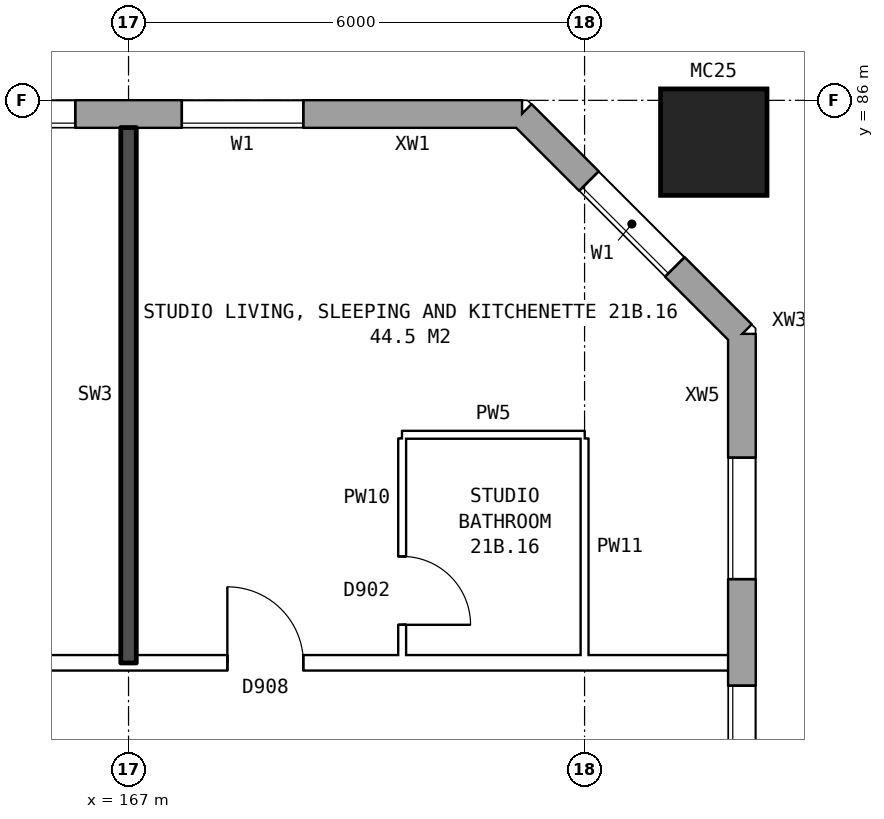
"""IFC4 building model, lengths in metres.
Left out: names, types, materials, properties, quantities, classifications, styles, units other than length and angle.
Written with IfcOpenShell. Run it as: python <this file> out.ifc"""

import sys

from ifc_helpers import new_model, si_unit, direction, frame, frame_2d, origin, origin_2d, place, context, subcontext, project, spatial, rectangle, hollow_rectangle, extrude, element, fill, save


model = new_model("IFC4")
c1 = context("Model", 3, precision=1e-05, world=origin(), true_north=direction((0.0, 1.0)))
c2 = subcontext(c1, "Body", "Model", "MODEL_VIEW")
j1 = project(units=[si_unit("LENGTHUNIT", "METRE"), si_unit("PLANEANGLEUNIT", "RADIAN")], contexts=[c1])
p1 = place(None, origin())
s1 = spatial("IfcSite", under=j1, at=p1, CompositionType="ELEMENT")
p2 = place(p1, origin())
s2 = spatial("IfcBuilding", under=s1, at=p2, CompositionType="ELEMENT")
p3 = place(p2, frame((0.0, 0.0, 77.8)))
s3 = spatial("IfcBuildingStorey", under=s2, at=p3, CompositionType="ELEMENT", Elevation=77.8)
p4 = place(p3, frame((174.7, 85.45, 0.0), z_axis=(0.0, 0.0, 1.0), x_axis=(1.0, 0.0, 0.0)))
e1 = element("IfcColumn", 1, at=p4, inside=s3, PredefinedType="COLUMN", context=c2, shape_type="SweptSolid", body=[
    extrude(hollow_rectangle(XDim=1.4, YDim=1.4, WallThickness=0.075, at=origin_2d()), origin(), (0.0, 0.0, 1.0), 3.1),
])
p5 = place(p3, frame((175.07, 57.075, 0.0), z_axis=(0.0, 0.0, 1.0), x_axis=(0.0, 1.0, 0.0)))
e2 = element("IfcWall", 2, at=p5, inside=s3, PredefinedType="STANDARD", context=c2, shape_type="SweptSolid", body=[
    extrude(rectangle(XDim=25.851, YDim=0.36, at=frame_2d((12.925, 0.0))), origin(), (0.0, 0.0, 1.0), 2.85),
])
p6 = place(p5, frame((1.625, 0.0, 0.8)))
e3 = element("IfcOpeningElement", 3, at=p6, cuts=e2, PredefinedType="OPENING", context=c2, shape_type="SweptSolid", body=[
    extrude(rectangle(XDim=1.6, YDim=1.8, at=frame_2d((0.8, 0.9))), frame((0.0, 0.19, 0.0), z_axis=(0.0, -1.0, 0.0), x_axis=(1.0, 0.0, 0.0)), (0.0, 0.0, 1.0), 0.38),
])
p7 = place(p5, frame((4.625, 0.0, 0.8)))
e4 = element("IfcOpeningElement", 4, at=p7, cuts=e2, PredefinedType="OPENING", context=c2, shape_type="SweptSolid", body=[
    extrude(rectangle(XDim=1.6, YDim=1.8, at=frame_2d((0.8, 0.9))), frame((0.0, 0.19, 0.0), z_axis=(0.0, -1.0, 0.0), x_axis=(1.0, 0.0, 0.0)), (0.0, 0.0, 1.0), 0.38),
])
p8 = place(p5, frame((7.625, 0.0, 0.8)))
e5 = element("IfcOpeningElement", 5, at=p8, cuts=e2, PredefinedType="OPENING", context=c2, shape_type="SweptSolid", body=[
    extrude(rectangle(XDim=1.6, YDim=1.8, at=frame_2d((0.8, 0.9))), frame((0.0, 0.19, 0.0), z_axis=(0.0, -1.0, 0.0), x_axis=(1.0, 0.0, 0.0)), (0.0, 0.0, 1.0), 0.38),
])
p9 = place(p5, frame((6.525, 0.0, 0.8)))
e6 = element("IfcOpeningElement", 6, at=p9, cuts=e2, PredefinedType="OPENING", context=c2, shape_type="SweptSolid", body=[
    extrude(rectangle(XDim=0.8, YDim=1.8, at=frame_2d((0.4, 0.9))), frame((0.0, 0.19, 0.0), z_axis=(0.0, -1.0, 0.0), x_axis=(1.0, 0.0, 0.0)), (0.0, 0.0, 1.0), 0.38),
])
p10 = place(p5, frame((9.525, 0.0, 0.8)))
e7 = element("IfcOpeningElement", 7, at=p10, cuts=e2, PredefinedType="OPENING", context=c2, shape_type="SweptSolid", body=[
    extrude(rectangle(XDim=1.4, YDim=1.2, at=frame_2d((0.7, 0.6))), frame((0.0, 0.19, 0.0), z_axis=(0.0, -1.0, 0.0), x_axis=(1.0, 0.0, 0.0)), (0.0, 0.0, 1.0), 0.38),
])
p11 = place(p5, frame((16.625, 0.0, 0.8)))
e8 = element("IfcOpeningElement", 8, at=p11, cuts=e2, PredefinedType="OPENING", context=c2, shape_type="SweptSolid", body=[
    extrude(rectangle(XDim=1.6, YDim=1.8, at=frame_2d((0.8, 0.9))), frame((0.0, 0.19, 0.0), z_axis=(0.0, -1.0, 0.0), x_axis=(1.0, 0.0, 0.0)), (0.0, 0.0, 1.0), 0.38),
])
p12 = place(p5, frame((19.625, 0.0, 0.8)))
e9 = element("IfcOpeningElement", 9, at=p12, cuts=e2, PredefinedType="OPENING", context=c2, shape_type="SweptSolid", body=[
    extrude(rectangle(XDim=1.6, YDim=1.8, at=frame_2d((0.8, 0.9))), frame((0.0, 0.19, 0.0), z_axis=(0.0, -1.0, 0.0), x_axis=(1.0, 0.0, 0.0)), (0.0, 0.0, 1.0), 0.38),
])
p13 = place(p5, frame((22.625, 0.0, 0.8)))
e10 = element("IfcOpeningElement", 10, at=p13, cuts=e2, PredefinedType="OPENING", context=c2, shape_type="SweptSolid", body=[
    extrude(rectangle(XDim=1.6, YDim=1.8, at=frame_2d((0.8, 0.9))), frame((0.0, 0.19, 0.0), z_axis=(0.0, -1.0, 0.0), x_axis=(1.0, 0.0, 0.0)), (0.0, 0.0, 1.0), 0.38),
])
p14 = place(p5, frame((12.275, 0.0, 0.8)))
e11 = element("IfcOpeningElement", 11, at=p14, cuts=e2, PredefinedType="OPENING", context=c2, shape_type="SweptSolid", body=[
    extrude(rectangle(XDim=1.2, YDim=1.8, at=frame_2d((0.6, 0.9))), frame((0.0, 0.19, 0.0), z_axis=(0.0, -1.0, 0.0), x_axis=(1.0, 0.0, 0.0)), (0.0, 0.0, 1.0), 0.38),
])
p15 = place(p5, frame((14.475, 0.0, 0.8)))
e12 = element("IfcOpeningElement", 12, at=p15, cuts=e2, PredefinedType="OPENING", context=c2, shape_type="SweptSolid", body=[
    extrude(rectangle(XDim=1.2, YDim=0.9, at=frame_2d((0.6, 0.45))), frame((0.0, 0.19, 0.0), z_axis=(0.0, -1.0, 0.0), x_axis=(1.0, 0.0, 0.0)), (0.0, 0.0, 1.0), 0.38),
])
p16 = place(p5, frame((18.525, 0.0, 0.8)))
e13 = element("IfcOpeningElement", 13, at=p16, cuts=e2, PredefinedType="OPENING", context=c2, shape_type="SweptSolid", body=[
    extrude(rectangle(XDim=0.6, YDim=1.8, at=frame_2d((0.3, 0.9))), frame((0.0, 0.19, 0.0), z_axis=(0.0, -1.0, 0.0), x_axis=(1.0, 0.0, 0.0)), (0.0, 0.0, 1.0), 0.38),
])
p17 = place(p3, frame((175.07, 82.925, 0.0), z_axis=(0.0, 0.0, 1.0), x_axis=(-0.707106781187, 0.707106781187, 0.0)))
e14 = element("IfcWall", 14, at=p17, inside=s3, PredefinedType="STANDARD", context=c2, shape_type="SweptSolid", body=[
    extrude(rectangle(XDim=4.094, YDim=0.36, at=frame_2d((2.047, 0.0))), origin(), (0.0, 0.0, 1.0), 2.85),
])
p18 = place(p17, frame((1.247, 0.0, 0.8)))
e15 = element("IfcOpeningElement", 15, at=p18, cuts=e14, PredefinedType="OPENING", context=c2, shape_type="SweptSolid", body=[
    extrude(rectangle(XDim=1.6, YDim=1.8, at=frame_2d((0.8, 0.9))), frame((0.0, 0.19, 0.0), z_axis=(0.0, -1.0, 0.0), x_axis=(1.0, 0.0, 0.0)), (0.0, 0.0, 1.0), 0.38),
])
p19 = place(p3, frame((172.175, 85.82, 0.0), z_axis=(0.0, 0.0, 1.0), x_axis=(-1.0, 0.0, 0.0)))
e16 = element("IfcWall", 16, at=p19, inside=s3, PredefinedType="STANDARD", context=c2, shape_type="SweptSolid", body=[
    extrude(rectangle(XDim=38.101, YDim=0.36, at=frame_2d((19.05, 0.0))), origin(), (0.0, 0.0, 1.0), 2.85),
])
p20 = place(p19, frame((2.875, 0.0, 0.8)))
e17 = element("IfcOpeningElement", 17, at=p20, cuts=e16, PredefinedType="OPENING", context=c2, shape_type="SweptSolid", body=[
    extrude(rectangle(XDim=1.6, YDim=1.8, at=frame_2d((0.8, 0.9))), frame((0.0, 0.19, 0.0), z_axis=(0.0, -1.0, 0.0), x_axis=(1.0, 0.0, 0.0)), (0.0, 0.0, 1.0), 0.38),
])
p21 = place(p19, frame((5.875, 0.0, 0.8)))
e18 = element("IfcOpeningElement", 18, at=p21, cuts=e16, PredefinedType="OPENING", context=c2, shape_type="SweptSolid", body=[
    extrude(rectangle(XDim=1.6, YDim=1.8, at=frame_2d((0.8, 0.9))), frame((0.0, 0.19, 0.0), z_axis=(0.0, -1.0, 0.0), x_axis=(1.0, 0.0, 0.0)), (0.0, 0.0, 1.0), 0.38),
])
p22 = place(p19, frame((7.775, 0.0, 1.7)))
e19 = element("IfcOpeningElement", 19, at=p22, cuts=e16, PredefinedType="OPENING", context=c2, shape_type="SweptSolid", body=[
    extrude(rectangle(XDim=0.6, YDim=0.9, at=frame_2d((0.3, 0.45))), frame((0.0, 0.19, 0.0), z_axis=(0.0, -1.0, 0.0), x_axis=(1.0, 0.0, 0.0)), (0.0, 0.0, 1.0), 0.38),
])
p23 = place(p19, frame((11.875, 0.0, 0.8)))
e20 = element("IfcOpeningElement", 20, at=p23, cuts=e16, PredefinedType="OPENING", context=c2, shape_type="SweptSolid", body=[
    extrude(rectangle(XDim=1.6, YDim=1.8, at=frame_2d((0.8, 0.9))), frame((0.0, 0.19, 0.0), z_axis=(0.0, -1.0, 0.0), x_axis=(1.0, 0.0, 0.0)), (0.0, 0.0, 1.0), 0.38),
])
p24 = place(p19, frame((14.875, 0.0, 0.8)))
e21 = element("IfcOpeningElement", 21, at=p24, cuts=e16, PredefinedType="OPENING", context=c2, shape_type="SweptSolid", body=[
    extrude(rectangle(XDim=1.6, YDim=1.8, at=frame_2d((0.8, 0.9))), frame((0.0, 0.19, 0.0), z_axis=(0.0, -1.0, 0.0), x_axis=(1.0, 0.0, 0.0)), (0.0, 0.0, 1.0), 0.38),
])
p25 = place(p19, frame((17.875, 0.0, 0.8)))
e22 = element("IfcOpeningElement", 22, at=p25, cuts=e16, PredefinedType="OPENING", context=c2, shape_type="SweptSolid", body=[
    extrude(rectangle(XDim=1.6, YDim=1.8, at=frame_2d((0.8, 0.9))), frame((0.0, 0.19, 0.0), z_axis=(0.0, -1.0, 0.0), x_axis=(1.0, 0.0, 0.0)), (0.0, 0.0, 1.0), 0.38),
])
p26 = place(p19, frame((20.875, 0.0, 0.8)))
e23 = element("IfcOpeningElement", 23, at=p26, cuts=e16, PredefinedType="OPENING", context=c2, shape_type="SweptSolid", body=[
    extrude(rectangle(XDim=1.6, YDim=1.8, at=frame_2d((0.8, 0.9))), frame((0.0, 0.19, 0.0), z_axis=(0.0, -1.0, 0.0), x_axis=(1.0, 0.0, 0.0)), (0.0, 0.0, 1.0), 0.38),
])
p27 = place(p19, frame((23.875, 0.0, 0.8)))
e24 = element("IfcOpeningElement", 24, at=p27, cuts=e16, PredefinedType="OPENING", context=c2, shape_type="SweptSolid", body=[
    extrude(rectangle(XDim=1.6, YDim=1.8, at=frame_2d((0.8, 0.9))), frame((0.0, 0.19, 0.0), z_axis=(0.0, -1.0, 0.0), x_axis=(1.0, 0.0, 0.0)), (0.0, 0.0, 1.0), 0.38),
])
p28 = place(p19, frame((26.325, 0.0, 0.65)))
e25 = element("IfcOpeningElement", 25, at=p28, cuts=e16, PredefinedType="OPENING", context=c2, shape_type="SweptSolid", body=[
    extrude(rectangle(XDim=1.4, YDim=1.8, at=frame_2d((0.7, 0.9))), frame((0.0, 0.19, 0.0), z_axis=(0.0, -1.0, 0.0), x_axis=(1.0, 0.0, 0.0)), (0.0, 0.0, 1.0), 0.38),
])
p29 = place(p19, frame((29.675, 0.0, 1.7)))
e26 = element("IfcOpeningElement", 26, at=p29, cuts=e16, PredefinedType="OPENING", context=c2, shape_type="SweptSolid", body=[
    extrude(rectangle(XDim=0.8, YDim=0.9, at=frame_2d((0.4, 0.45))), frame((0.0, 0.19, 0.0), z_axis=(0.0, -1.0, 0.0), x_axis=(1.0, 0.0, 0.0)), (0.0, 0.0, 1.0), 0.38),
])
p30 = place(p19, frame((32.875, 0.0, 0.8)))
e27 = element("IfcOpeningElement", 27, at=p30, cuts=e16, PredefinedType="OPENING", context=c2, shape_type="SweptSolid", body=[
    extrude(rectangle(XDim=1.6, YDim=1.8, at=frame_2d((0.8, 0.9))), frame((0.0, 0.19, 0.0), z_axis=(0.0, -1.0, 0.0), x_axis=(1.0, 0.0, 0.0)), (0.0, 0.0, 1.0), 0.38),
])
p31 = place(p19, frame((35.875, 0.0, 0.8)))
e28 = element("IfcOpeningElement", 28, at=p31, cuts=e16, PredefinedType="OPENING", context=c2, shape_type="SweptSolid", body=[
    extrude(rectangle(XDim=1.6, YDim=1.8, at=frame_2d((0.8, 0.9))), frame((0.0, 0.19, 0.0), z_axis=(0.0, -1.0, 0.0), x_axis=(1.0, 0.0, 0.0)), (0.0, 0.0, 1.0), 0.38),
])
p32 = place(p19, frame((9.575, 0.0, 0.8)))
e29 = element("IfcOpeningElement", 29, at=p32, cuts=e16, PredefinedType="OPENING", context=c2, shape_type="SweptSolid", body=[
    extrude(rectangle(XDim=1.4, YDim=0.9, at=frame_2d((0.7, 0.45))), frame((0.0, 0.19, 0.0), z_axis=(0.0, -1.0, 0.0), x_axis=(1.0, 0.0, 0.0)), (0.0, 0.0, 1.0), 0.38),
])
p33 = place(p19, frame((28.025, 0.0, 0.65)))
e30 = element("IfcOpeningElement", 30, at=p33, cuts=e16, PredefinedType="OPENING", context=c2, shape_type="SweptSolid", body=[
    extrude(rectangle(XDim=0.6, YDim=0.9, at=frame_2d((0.3, 0.45))), frame((0.0, 0.19, 0.0), z_axis=(0.0, -1.0, 0.0), x_axis=(1.0, 0.0, 0.0)), (0.0, 0.0, 1.0), 0.38),
])
p34 = place(p19, frame((30.775, 0.0, 0.8)))
e31 = element("IfcOpeningElement", 31, at=p34, cuts=e16, PredefinedType="OPENING", context=c2, shape_type="SweptSolid", body=[
    extrude(rectangle(XDim=1.6, YDim=1.8, at=frame_2d((0.8, 0.9))), frame((0.0, 0.19, 0.0), z_axis=(0.0, -1.0, 0.0), x_axis=(1.0, 0.0, 0.0)), (0.0, 0.0, 1.0), 0.38),
])
p35 = place(p3, frame((155.1, 78.6, 0.0), z_axis=(0.0, 0.0, 1.0), x_axis=(1.0, 0.0, 0.0)))
e32 = element("IfcWall", 32, at=p35, inside=s3, PredefinedType="PARTITIONING", context=c2, shape_type="SweptSolid", body=[
    extrude(rectangle(XDim=19.79, YDim=0.2, at=frame_2d((9.895, 0.0))), origin(), (0.0, 0.0, 1.0), 2.85),
])
p36 = place(p35, frame((1.45, 0.0, 0.0)))
e33 = element("IfcOpeningElement", 33, at=p36, cuts=e32, PredefinedType="OPENING", context=c2, shape_type="SweptSolid", body=[
    extrude(rectangle(XDim=1.0, YDim=2.1, at=frame_2d((0.5, 1.05))), frame((0.0, 0.11, 0.0), z_axis=(0.0, -1.0, 0.0), x_axis=(1.0, 0.0, 0.0)), (0.0, 0.0, 1.0), 0.22),
])
p37 = place(p35, frame((9.6, 0.0, 0.0)))
e34 = element("IfcOpeningElement", 34, at=p37, cuts=e32, PredefinedType="OPENING", context=c2, shape_type="SweptSolid", body=[
    extrude(rectangle(XDim=1.0, YDim=2.1, at=frame_2d((0.5, 1.05))), frame((0.0, 0.11, 0.0), z_axis=(0.0, -1.0, 0.0), x_axis=(1.0, 0.0, 0.0)), (0.0, 0.0, 1.0), 0.22),
])
p38 = place(p35, frame((13.2, 0.0, 0.0)))
e35 = element("IfcOpeningElement", 35, at=p38, cuts=e32, PredefinedType="OPENING", context=c2, shape_type="SweptSolid", body=[
    extrude(rectangle(XDim=1.0, YDim=2.1, at=frame_2d((0.5, 1.05))), frame((0.0, 0.11, 0.0), z_axis=(0.0, -1.0, 0.0), x_axis=(1.0, 0.0, 0.0)), (0.0, 0.0, 1.0), 0.22),
])
p39 = place(p3, frame((170.6, 81.6, 0.0), z_axis=(0.0, 0.0, 1.0), x_axis=(1.0, 0.0, 0.0)))
e36 = element("IfcWall", 36, at=p39, inside=s3, PredefinedType="PARTITIONING", context=c2, shape_type="SweptSolid", body=[
    extrude(rectangle(XDim=2.4, YDim=0.1, at=frame_2d((1.2, 0.0))), origin(), (0.0, 0.0, 1.0), 2.85),
])
p40 = place(p3, frame((167.0, 78.6, 0.0), z_axis=(0.0, 0.0, 1.0), x_axis=(0.0, 1.0, 0.0)))
e37 = element("IfcWall", 37, at=p40, inside=s3, PredefinedType="SOLIDWALL", context=c2, shape_type="SweptSolid", body=[
    extrude(rectangle(XDim=7.04, YDim=0.2, at=frame_2d((3.52, 0.0))), origin(), (0.0, 0.0, 1.0), 2.85),
])
p41 = place(p3, frame((170.6, 78.7, 0.0), z_axis=(0.0, 0.0, 1.0), x_axis=(0.0, 1.0, 0.0)))
e38 = element("IfcWall", 38, at=p41, inside=s3, PredefinedType="PARTITIONING", context=c2, shape_type="SweptSolid", body=[
    extrude(rectangle(XDim=2.85, YDim=0.1, at=frame_2d((1.425, 0.0))), origin(), (0.0, 0.0, 1.0), 2.85),
])
p42 = place(p41, frame((0.4, 0.0, 0.0)))
e39 = element("IfcOpeningElement", 39, at=p42, cuts=e38, PredefinedType="OPENING", context=c2, shape_type="SweptSolid", body=[
    extrude(rectangle(XDim=0.9, YDim=2.1, at=frame_2d((0.45, 1.05))), frame((0.0, 0.06, 0.0), z_axis=(0.0, -1.0, 0.0), x_axis=(1.0, 0.0, 0.0)), (0.0, 0.0, 1.0), 0.12),
])
p43 = place(p3, frame((173.0, 78.7, 0.0), z_axis=(0.0, 0.0, 1.0), x_axis=(0.0, 1.0, 0.0)))
e40 = element("IfcWall", 40, at=p43, inside=s3, PredefinedType="PARTITIONING", context=c2, shape_type="SweptSolid", body=[
    extrude(rectangle(XDim=2.85, YDim=0.1, at=frame_2d((1.425, 0.0))), origin(), (0.0, 0.0, 1.0), 2.85),
])
p44 = place(p12, origin())
e41 = element("IfcWindow", 41, at=p44, inside=s3, PartitioningType="SINGLE_PANEL", PredefinedType="WINDOW", context=c2, shape_type="SweptSolid", body=[
    extrude(rectangle(XDim=1.6, YDim=1.8, at=frame_2d((0.8, 0.9))), frame((0.0, 0.15, 0.0), z_axis=(0.0, -1.0, 0.0), x_axis=(1.0, 0.0, 0.0)), (0.0, 0.0, 1.0), 0.06),
])
fill(e9, e41)
p45 = place(p13, origin())
e42 = element("IfcWindow", 42, at=p45, inside=s3, PartitioningType="SINGLE_PANEL", PredefinedType="WINDOW", context=c2, shape_type="SweptSolid", body=[
    extrude(rectangle(XDim=1.6, YDim=1.8, at=frame_2d((0.8, 0.9))), frame((0.0, 0.15, 0.0), z_axis=(0.0, -1.0, 0.0), x_axis=(1.0, 0.0, 0.0)), (0.0, 0.0, 1.0), 0.06),
])
fill(e10, e42)
p46 = place(p18, origin())
e43 = element("IfcWindow", 43, at=p46, inside=s3, PartitioningType="SINGLE_PANEL", PredefinedType="WINDOW", context=c2, shape_type="SweptSolid", body=[
    extrude(rectangle(XDim=1.6, YDim=1.8, at=frame_2d((0.8, 0.9))), frame((0.0, 0.15, 0.0), z_axis=(0.0, -1.0, 0.0), x_axis=(1.0, 0.0, 0.0)), (0.0, 0.0, 1.0), 0.06),
])
fill(e15, e43)
p47 = place(p20, origin())
e44 = element("IfcWindow", 44, at=p47, inside=s3, PartitioningType="SINGLE_PANEL", PredefinedType="WINDOW", context=c2, shape_type="SweptSolid", body=[
    extrude(rectangle(XDim=1.6, YDim=1.8, at=frame_2d((0.8, 0.9))), frame((0.0, 0.15, 0.0), z_axis=(0.0, -1.0, 0.0), x_axis=(1.0, 0.0, 0.0)), (0.0, 0.0, 1.0), 0.06),
])
fill(e17, e44)
p48 = place(p21, origin())
e45 = element("IfcWindow", 45, at=p48, inside=s3, PartitioningType="SINGLE_PANEL", PredefinedType="WINDOW", context=c2, shape_type="SweptSolid", body=[
    extrude(rectangle(XDim=1.6, YDim=1.8, at=frame_2d((0.8, 0.9))), frame((0.0, 0.15, 0.0), z_axis=(0.0, -1.0, 0.0), x_axis=(1.0, 0.0, 0.0)), (0.0, 0.0, 1.0), 0.06),
])
fill(e18, e45)
p49 = place(p38, origin())
e46 = element("IfcDoor", 46, at=p49, inside=s3, OperationType="SINGLE_SWING_LEFT", PredefinedType="DOOR", context=c2, shape_type="SweptSolid", body=[
    extrude(rectangle(XDim=1.0, YDim=2.1, at=frame_2d((0.5, 1.05))), frame((0.0, 0.025, 0.0), z_axis=(0.0, -1.0, 0.0), x_axis=(1.0, 0.0, 0.0)), (0.0, 0.0, 1.0), 0.05),
])
fill(e35, e46)
p50 = place(p42, frame((0.9, 0.0, 0.0), z_axis=(0.0, 0.0, 1.0), x_axis=(-1.0, 0.0, 0.0)))
e47 = element("IfcDoor", 47, at=p50, inside=s3, OperationType="SINGLE_SWING_RIGHT", PredefinedType="DOOR", context=c2, shape_type="SweptSolid", body=[
    extrude(rectangle(XDim=0.9, YDim=2.1, at=frame_2d((0.45, 1.05))), frame((0.0, 0.025, 0.0), z_axis=(0.0, -1.0, 0.0), x_axis=(1.0, 0.0, 0.0)), (0.0, 0.0, 1.0), 0.05),
])
fill(e39, e47)
save(model, sys.argv[1])
